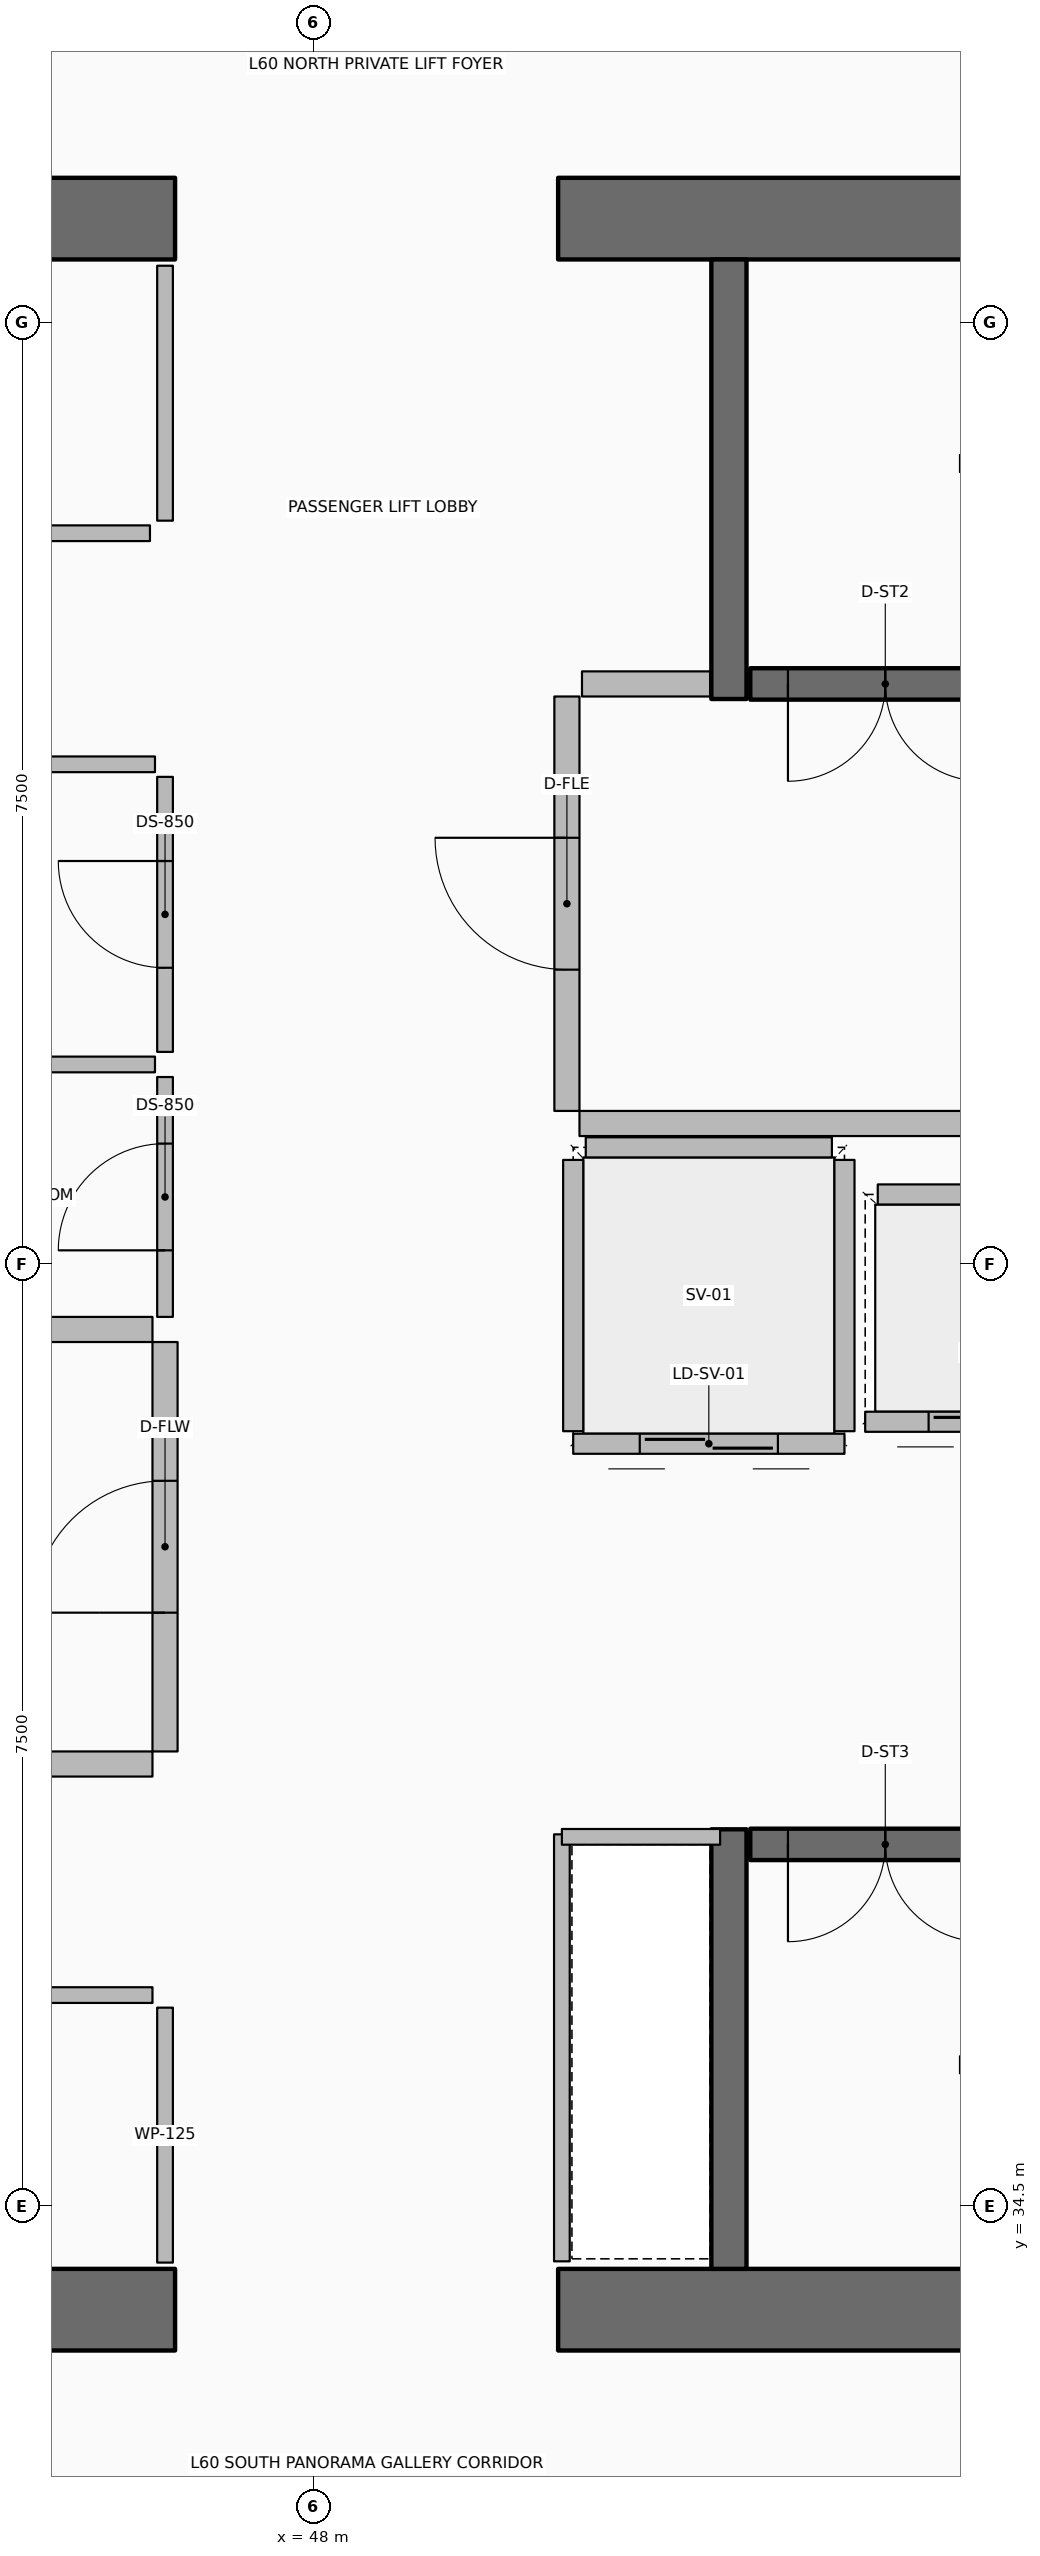
"""IFC4 building model, lengths in metres.
Left out: names, types, materials, properties, quantities, classifications, styles, units other than length and angle.
Written with IfcOpenShell. Run it as: python <this file> out.ifc"""

import sys

from ifc_helpers import new_model, si_unit, direction, frame, frame_2d, origin, place, context, subcontext, project, spatial, rectangle, extrude, element, fill, save


model = new_model("IFC4")
c1 = context("Model", 3, precision=1e-05, world=origin(), true_north=direction((0.0, 1.0)))
c2 = subcontext(c1, "Body", "Model", "MODEL_VIEW")
j1 = project(units=[si_unit("LENGTHUNIT", "METRE"), si_unit("PLANEANGLEUNIT", "RADIAN")], contexts=[c1])
p1 = place(None, origin())
s1 = spatial("IfcSite", under=j1, at=p1, CompositionType="ELEMENT")
p2 = place(p1, origin())
s2 = spatial("IfcBuilding", under=s1, at=p2, CompositionType="ELEMENT")
p3 = place(p2, frame((0.0, 0.0, 236.7)))
s3 = spatial("IfcBuildingStorey", under=s2, at=p3, CompositionType="ELEMENT", Elevation=236.7)
for number, where, z_axis, x_axis in (
    (1, (37.15, 33.675, 0.0), (0.0, 0.0, 1.0), (1.0, 0.0, 0.0)),
    (2, (49.95, 33.675, 0.0), (0.0, 0.0, 1.0), (1.0, 0.0, 0.0)),
    (3, (37.15, 50.325, 0.0), (0.0, 0.0, 1.0), (1.0, 0.0, 0.0)),
    (4, (49.95, 50.325, 0.0), (0.0, 0.0, 1.0), (1.0, 0.0, 0.0)),
):
    element("IfcWall", number, at=place(p3, frame(where, z_axis=z_axis, x_axis=x_axis)), inside=s3, PredefinedType="SHEAR", context=c2, shape_type="SweptSolid", body=[
        extrude(rectangle(XDim=9.75, YDim=0.65, at=frame_2d((4.875, 0.0))), origin(), (0.0, 0.0, 1.0), 3.85),
    ])
for number, where, z_axis, x_axis in (
    (5, (51.31, 46.5, 0.0), (0.0, 0.0, 1.0), (0.0, 1.0, 0.0)),
    (6, (51.31, 34.0, 0.0), (0.0, 0.0, 1.0), (0.0, 1.0, 0.0)),
):
    element("IfcWall", number, at=place(p3, frame(where, z_axis=z_axis, x_axis=x_axis)), inside=s3, PredefinedType="SHEAR", context=c2, shape_type="SweptSolid", body=[
        extrude(rectangle(XDim=3.5, YDim=0.28, at=frame_2d((1.75, 0.0))), origin(), (0.0, 0.0, 1.0), 3.85),
    ])
p4 = place(p3, frame((51.48, 46.62, 0.0), z_axis=(0.0, 0.0, 1.0), x_axis=(1.0, 0.0, 0.0)))
e7 = element("IfcWall", 7, at=p4, inside=s3, PredefinedType="SOLIDWALL", context=c2, shape_type="SweptSolid", body=[
    extrude(rectangle(XDim=7.54, YDim=0.25, at=frame_2d((3.77, 0.0))), origin(), (0.0, 0.0, 1.0), 3.59),
])
p5 = place(p4, frame((0.3, 0.0, 0.0)))
e8 = element("IfcOpeningElement", 8, at=p5, cuts=e7, PredefinedType="OPENING", context=c2, shape_type="SweptSolid", body=[
    extrude(rectangle(XDim=1.55, YDim=2.15, at=frame_2d((0.775, 1.075))), frame((0.0, 0.135, 0.0), z_axis=(0.0, -1.0, 0.0), x_axis=(1.0, 0.0, 0.0)), (0.0, 0.0, 1.0), 0.27),
])
p6 = place(p3, frame((51.48, 37.38, 0.0), z_axis=(0.0, 0.0, 1.0), x_axis=(1.0, 0.0, 0.0)))
e9 = element("IfcWall", 9, at=p6, inside=s3, PredefinedType="SOLIDWALL", context=c2, shape_type="SweptSolid", body=[
    extrude(rectangle(XDim=7.54, YDim=0.25, at=frame_2d((3.77, 0.0))), origin(), (0.0, 0.0, 1.0), 3.59),
])
p7 = place(p6, frame((0.3, 0.0, 0.0)))
e10 = element("IfcOpeningElement", 10, at=p7, cuts=e9, PredefinedType="OPENING", context=c2, shape_type="SweptSolid", body=[
    extrude(rectangle(XDim=1.55, YDim=2.15, at=frame_2d((0.775, 1.075))), frame((0.0, 0.135, 0.0), z_axis=(0.0, -1.0, 0.0), x_axis=(1.0, 0.0, 0.0)), (0.0, 0.0, 1.0), 0.27),
])
p8 = place(p3, frame((46.58, 47.945, 0.0), z_axis=(0.0, 0.0, 1.0), x_axis=(-1.0, 0.0, 0.0)))
e11 = element("IfcWall", 11, at=p8, inside=s3, PredefinedType="PARTITIONING", context=c2, shape_type="SweptSolid", body=[
    extrude(rectangle(XDim=2.26, YDim=0.16, at=frame_2d((1.13, 0.0))), origin(), (0.0, 0.0, 1.0), 3.59),
])
p9 = place(p3, frame((46.58, 48.045, 0.0), z_axis=(0.0, 0.0, 1.0), x_axis=(0.0, 1.0, 0.0)))
e12 = element("IfcWall", 12, at=p9, inside=s3, PredefinedType="PARTITIONING", context=c2, shape_type="SweptSolid", body=[
    extrude(rectangle(XDim=1.71, YDim=0.16, at=frame_2d((0.855, 0.0))), origin(), (0.0, 0.0, 1.0), 3.59),
])
p10 = place(p3, frame((44.32, 36.055, 0.0), z_axis=(0.0, 0.0, 1.0), x_axis=(1.0, 0.0, 0.0)))
e13 = element("IfcWall", 13, at=p10, inside=s3, PredefinedType="PARTITIONING", context=c2, shape_type="SweptSolid", body=[
    extrude(rectangle(XDim=2.26, YDim=0.16, at=frame_2d((1.13, 0.0))), origin(), (0.0, 0.0, 1.0), 3.59),
])
p11 = place(p3, frame((46.58, 34.245, 0.0), z_axis=(0.0, 0.0, 1.0), x_axis=(0.0, 1.0, 0.0)))
e14 = element("IfcWall", 14, at=p11, inside=s3, PredefinedType="PARTITIONING", context=c2, shape_type="SweptSolid", body=[
    extrude(rectangle(XDim=1.71, YDim=0.16, at=frame_2d((0.855, 0.0))), origin(), (0.0, 0.0, 1.0), 3.59),
])
p12 = place(p3, frame((54.505, 40.745, 0.0), z_axis=(0.0, 0.0, 1.0), x_axis=(-1.0, 0.0, 0.0)))
e15 = element("IfcWall", 15, at=p12, inside=s3, PredefinedType="PARTITIONING", context=c2, shape_type="SweptSolid", body=[
    extrude(rectangle(XDim=2.11, YDim=0.16, at=frame_2d((1.055, 0.0))), origin(), (0.0, 0.0, 1.0), 3.59),
])
p13 = place(p12, frame((0.505, 0.0, 0.0)))
e16 = element("IfcOpeningElement", 16, at=p13, cuts=e15, PredefinedType="OPENING", context=c2, shape_type="SweptSolid", body=[
    extrude(rectangle(XDim=1.1, YDim=2.1, at=frame_2d((0.55, 1.05))), frame((0.0, 0.09, 0.0), z_axis=(0.0, -1.0, 0.0), x_axis=(1.0, 0.0, 0.0)), (0.0, 0.0, 1.0), 0.18),
])
p14 = place(p3, frame((52.495, 42.555, 0.0), z_axis=(0.0, 0.0, 1.0), x_axis=(1.0, 0.0, 0.0)))
e17 = element("IfcWall", 17, at=p14, inside=s3, PredefinedType="PARTITIONING", context=c2, shape_type="SweptSolid", body=[
    extrude(rectangle(XDim=1.91, YDim=0.16, at=frame_2d((0.955, 0.0))), origin(), (0.0, 0.0, 1.0), 3.59),
])
p15 = place(p3, frame((52.23, 40.57, 0.0), z_axis=(0.0, 0.0, 1.0), x_axis=(-1.0, 0.0, 0.0)))
e18 = element("IfcWall", 18, at=p15, inside=s3, PredefinedType="PARTITIONING", context=c2, shape_type="SweptSolid", body=[
    extrude(rectangle(XDim=2.16, YDim=0.16, at=frame_2d((1.08, 0.0))), origin(), (0.0, 0.0, 1.0), 3.59),
])
p16 = place(p15, frame((0.53, 0.0, 0.0)))
e19 = element("IfcOpeningElement", 19, at=p16, cuts=e18, PredefinedType="OPENING", context=c2, shape_type="SweptSolid", body=[
    extrude(rectangle(XDim=1.1, YDim=2.1, at=frame_2d((0.55, 1.05))), frame((0.0, 0.09, 0.0), z_axis=(0.0, -1.0, 0.0), x_axis=(1.0, 0.0, 0.0)), (0.0, 0.0, 1.0), 0.18),
])
for number, where, z_axis, x_axis in (
    (20, (52.23, 40.67, 0.0), (0.0, 0.0, 1.0), (0.0, 1.0, 0.0)),
    (21, (50.07, 40.67, 0.0), (0.0, 0.0, 1.0), (0.0, 1.0, 0.0)),
):
    element("IfcWall", number, at=place(p3, frame(where, z_axis=z_axis, x_axis=x_axis)), inside=s3, PredefinedType="PARTITIONING", context=c2, shape_type="SweptSolid", body=[
        extrude(rectangle(XDim=2.16, YDim=0.16, at=frame_2d((1.08, 0.0))), origin(), (0.0, 0.0, 1.0), 3.59),
    ])
p17 = place(p3, frame((50.17, 42.93, 0.0), z_axis=(0.0, 0.0, 1.0), x_axis=(1.0, 0.0, 0.0)))
e22 = element("IfcWall", 22, at=p17, inside=s3, PredefinedType="PARTITIONING", context=c2, shape_type="SweptSolid", body=[
    extrude(rectangle(XDim=1.96, YDim=0.16, at=frame_2d((0.98, 0.0))), origin(), (0.0, 0.0, 1.0), 3.59),
])
p18 = place(p3, frame((41.35, 38.02, 0.0), z_axis=(0.0, 0.0, 1.0), x_axis=(1.0, 0.0, 0.0)))
e23 = element("IfcWall", 23, at=p18, inside=s3, PredefinedType="PARTITIONING", context=c2, shape_type="SweptSolid", body=[
    extrude(rectangle(XDim=5.37, YDim=0.2, at=frame_2d((2.685, 0.0))), origin(), (0.0, 0.0, 1.0), 3.59),
])
p19 = place(p3, frame((43.92, 41.48, 0.0), z_axis=(0.0, 0.0, 1.0), x_axis=(1.0, 0.0, 0.0)))
e24 = element("IfcWall", 24, at=p19, inside=s3, PredefinedType="PARTITIONING", context=c2, shape_type="SweptSolid", body=[
    extrude(rectangle(XDim=2.8, YDim=0.2, at=frame_2d((1.4, 0.0))), origin(), (0.0, 0.0, 1.0), 3.59),
])
p20 = place(p3, frame((46.82, 38.12, 0.0), z_axis=(0.0, 0.0, 1.0), x_axis=(0.0, 1.0, 0.0)))
e25 = element("IfcWall", 25, at=p20, inside=s3, PredefinedType="PARTITIONING", context=c2, shape_type="SweptSolid", body=[
    extrude(rectangle(XDim=3.26, YDim=0.2, at=frame_2d((1.63, 0.0))), origin(), (0.0, 0.0, 1.0), 3.59),
])
p21 = place(p20, frame((1.105, 0.0, 0.0)))
e26 = element("IfcOpeningElement", 26, at=p21, cuts=e25, PredefinedType="OPENING", context=c2, shape_type="SweptSolid", body=[
    extrude(rectangle(XDim=1.05, YDim=2.1, at=frame_2d((0.525, 1.05))), frame((0.0, 0.11, 0.0), z_axis=(0.0, -1.0, 0.0), x_axis=(1.0, 0.0, 0.0)), (0.0, 0.0, 1.0), 0.22),
])
p22 = place(p3, frame((50.12, 43.12, 0.0), z_axis=(0.0, 0.0, 1.0), x_axis=(1.0, 0.0, 0.0)))
e27 = element("IfcWall", 27, at=p22, inside=s3, PredefinedType="PARTITIONING", context=c2, shape_type="SweptSolid", body=[
    extrude(rectangle(XDim=8.88, YDim=0.2, at=frame_2d((4.44, 0.0))), origin(), (0.0, 0.0, 1.0), 3.59),
])
p23 = place(p3, frame((50.14, 46.62, 0.0), z_axis=(0.0, 0.0, 1.0), x_axis=(1.0, 0.0, 0.0)))
e28 = element("IfcWall", 28, at=p23, inside=s3, PredefinedType="PARTITIONING", context=c2, shape_type="SweptSolid", body=[
    extrude(rectangle(XDim=1.02, YDim=0.2, at=frame_2d((0.51, 0.0))), origin(), (0.0, 0.0, 1.0), 3.59),
])
p24 = place(p3, frame((50.02, 43.22, 0.0), z_axis=(0.0, 0.0, 1.0), x_axis=(0.0, 1.0, 0.0)))
e29 = element("IfcWall", 29, at=p24, inside=s3, PredefinedType="PARTITIONING", context=c2, shape_type="SweptSolid", body=[
    extrude(rectangle(XDim=3.3, YDim=0.2, at=frame_2d((1.65, 0.0))), origin(), (0.0, 0.0, 1.0), 3.59),
])
p25 = place(p24, frame((1.125, 0.0, 0.0)))
e30 = element("IfcOpeningElement", 30, at=p25, cuts=e29, PredefinedType="OPENING", context=c2, shape_type="SweptSolid", body=[
    extrude(rectangle(XDim=1.05, YDim=2.1, at=frame_2d((0.525, 1.05))), frame((0.0, 0.11, 0.0), z_axis=(0.0, -1.0, 0.0), x_axis=(1.0, 0.0, 0.0)), (0.0, 0.0, 1.0), 0.22),
])
p26 = place(p3, frame((41.36, 45.98, 0.0), z_axis=(0.0, 0.0, 1.0), x_axis=(1.0, 0.0, 0.0)))
e31 = element("IfcWall", 31, at=p26, inside=s3, PredefinedType="PARTITIONING", context=c2, shape_type="SweptSolid", body=[
    extrude(rectangle(XDim=5.36, YDim=0.125, at=frame_2d((2.68, 0.0))), origin(), (0.0, 0.0, 1.0), 3.03),
])
p27 = place(p3, frame((49.98, 34.06, 0.0), z_axis=(0.0, 0.0, 1.0), x_axis=(0.0, 1.0, 0.0)))
e32 = element("IfcWall", 32, at=p27, inside=s3, PredefinedType="PARTITIONING", context=c2, shape_type="SweptSolid", body=[
    extrude(rectangle(XDim=3.4, YDim=0.125, at=frame_2d((1.7, 0.0))), origin(), (0.0, 0.0, 1.0), 3.03),
])
p28 = place(p3, frame((49.98, 37.44, 0.0), z_axis=(0.0, 0.0, 1.0), x_axis=(1.0, 0.0, 0.0)))
e33 = element("IfcWall", 33, at=p28, inside=s3, PredefinedType="PARTITIONING", context=c2, shape_type="SweptSolid", body=[
    extrude(rectangle(XDim=1.26, YDim=0.125, at=frame_2d((0.63, 0.0))), origin(), (0.0, 0.0, 1.0), 3.03),
])
p29 = place(p3, frame((44.03, 43.73, 0.0), z_axis=(0.0, 0.0, 1.0), x_axis=(1.0, 0.0, 0.0)))
e34 = element("IfcWall", 34, at=p29, inside=s3, PredefinedType="PARTITIONING", context=c2, shape_type="SweptSolid", body=[
    extrude(rectangle(XDim=2.71, YDim=0.125, at=frame_2d((1.355, 0.0))), origin(), (0.0, 0.0, 1.0), 3.03),
])
p30 = place(p3, frame((46.82, 41.58, 0.0), z_axis=(0.0, 0.0, 1.0), x_axis=(0.0, 1.0, 0.0)))
e35 = element("IfcWall", 35, at=p30, inside=s3, PredefinedType="PARTITIONING", context=c2, shape_type="SweptSolid", body=[
    extrude(rectangle(XDim=2.05, YDim=0.125, at=frame_2d((1.025, 0.0))), origin(), (0.0, 0.0, 1.0), 3.03),
])
p31 = place(p30, frame((0.6, 0.0, 0.0)))
e36 = element("IfcOpeningElement", 36, at=p31, cuts=e35, PredefinedType="OPENING", context=c2, shape_type="SweptSolid", body=[
    extrude(rectangle(XDim=0.85, YDim=2.06, at=frame_2d((0.425, 1.03))), frame((0.0, 0.073, 0.0), z_axis=(0.0, -1.0, 0.0), x_axis=(1.0, 0.0, 0.0)), (0.0, 0.0, 1.0), 0.145),
])
p32 = place(p3, frame((46.82, 43.83, 0.0), z_axis=(0.0, 0.0, 1.0), x_axis=(0.0, 1.0, 0.0)))
e37 = element("IfcWall", 37, at=p32, inside=s3, PredefinedType="PARTITIONING", context=c2, shape_type="SweptSolid", body=[
    extrude(rectangle(XDim=2.05, YDim=0.125, at=frame_2d((1.025, 0.0))), origin(), (0.0, 0.0, 1.0), 3.03),
])
p33 = place(p32, frame((0.6, 0.0, 0.0)))
e38 = element("IfcOpeningElement", 38, at=p33, cuts=e37, PredefinedType="OPENING", context=c2, shape_type="SweptSolid", body=[
    extrude(rectangle(XDim=0.85, YDim=2.06, at=frame_2d((0.425, 1.03))), frame((0.0, 0.073, 0.0), z_axis=(0.0, -1.0, 0.0), x_axis=(1.0, 0.0, 0.0)), (0.0, 0.0, 1.0), 0.145),
])
p34 = place(p5, origin())
e39 = element("IfcDoor", 39, at=p34, inside=s3, OperationType="DOUBLE_DOOR_SINGLE_SWING", PredefinedType="DOOR", context=c2, shape_type="SweptSolid", body=[
    extrude(rectangle(XDim=1.55, YDim=2.15, at=frame_2d((0.775, 1.075))), frame((0.0, 0.025, 0.0), z_axis=(0.0, -1.0, 0.0), x_axis=(1.0, 0.0, 0.0)), (0.0, 0.0, 1.0), 0.05),
])
fill(e8, e39)
p35 = place(p7, origin())
e40 = element("IfcDoor", 40, at=p35, inside=s3, OperationType="DOUBLE_DOOR_SINGLE_SWING", PredefinedType="DOOR", context=c2, shape_type="SweptSolid", body=[
    extrude(rectangle(XDim=1.55, YDim=2.15, at=frame_2d((0.775, 1.075))), frame((0.0, 0.025, 0.0), z_axis=(0.0, -1.0, 0.0), x_axis=(1.0, 0.0, 0.0)), (0.0, 0.0, 1.0), 0.05),
])
fill(e10, e40)
p36 = place(p13, origin())
e41 = element("IfcDoor", 41, at=p36, inside=s3, OperationType="DOUBLE_DOOR_SLIDING", PredefinedType="DOOR", context=c2, shape_type="SweptSolid", body=[
    extrude(rectangle(XDim=1.1, YDim=2.1, at=frame_2d((0.55, 1.05))), frame((0.0, 0.025, 0.0), z_axis=(0.0, -1.0, 0.0), x_axis=(1.0, 0.0, 0.0)), (0.0, 0.0, 1.0), 0.05),
])
fill(e16, e41)
p37 = place(p16, origin())
e42 = element("IfcDoor", 42, at=p37, inside=s3, OperationType="DOUBLE_DOOR_SLIDING", PredefinedType="DOOR", context=c2, shape_type="SweptSolid", body=[
    extrude(rectangle(XDim=1.1, YDim=2.1, at=frame_2d((0.55, 1.05))), frame((0.0, 0.025, 0.0), z_axis=(0.0, -1.0, 0.0), x_axis=(1.0, 0.0, 0.0)), (0.0, 0.0, 1.0), 0.05),
])
fill(e19, e42)
p38 = place(p21, origin())
e43 = element("IfcDoor", 43, at=p38, inside=s3, OperationType="SINGLE_SWING_RIGHT", PredefinedType="DOOR", context=c2, shape_type="SweptSolid", body=[
    extrude(rectangle(XDim=1.05, YDim=2.1, at=frame_2d((0.525, 1.05))), frame((0.0, 0.025, 0.0), z_axis=(0.0, -1.0, 0.0), x_axis=(1.0, 0.0, 0.0)), (0.0, 0.0, 1.0), 0.05),
])
fill(e26, e43)
p39 = place(p25, origin())
e44 = element("IfcDoor", 44, at=p39, inside=s3, OperationType="SINGLE_SWING_LEFT", PredefinedType="DOOR", context=c2, shape_type="SweptSolid", body=[
    extrude(rectangle(XDim=1.05, YDim=2.1, at=frame_2d((0.525, 1.05))), frame((0.0, 0.025, 0.0), z_axis=(0.0, -1.0, 0.0), x_axis=(1.0, 0.0, 0.0)), (0.0, 0.0, 1.0), 0.05),
])
fill(e30, e44)
p40 = place(p31, origin())
e45 = element("IfcDoor", 45, at=p40, inside=s3, OperationType="SINGLE_SWING_RIGHT", PredefinedType="DOOR", context=c2, shape_type="SweptSolid", body=[
    extrude(rectangle(XDim=0.85, YDim=2.06, at=frame_2d((0.425, 1.03))), frame((0.0, 0.025, 0.0), z_axis=(0.0, -1.0, 0.0), x_axis=(1.0, 0.0, 0.0)), (0.0, 0.0, 1.0), 0.05),
])
fill(e36, e45)
p41 = place(p33, origin())
e46 = element("IfcDoor", 46, at=p41, inside=s3, OperationType="SINGLE_SWING_LEFT", PredefinedType="DOOR", context=c2, shape_type="SweptSolid", body=[
    extrude(rectangle(XDim=0.85, YDim=2.06, at=frame_2d((0.425, 1.03))), frame((0.0, 0.025, 0.0), z_axis=(0.0, -1.0, 0.0), x_axis=(1.0, 0.0, 0.0)), (0.0, 0.0, 1.0), 0.05),
])
fill(e38, e46)
save(model, sys.argv[1])
